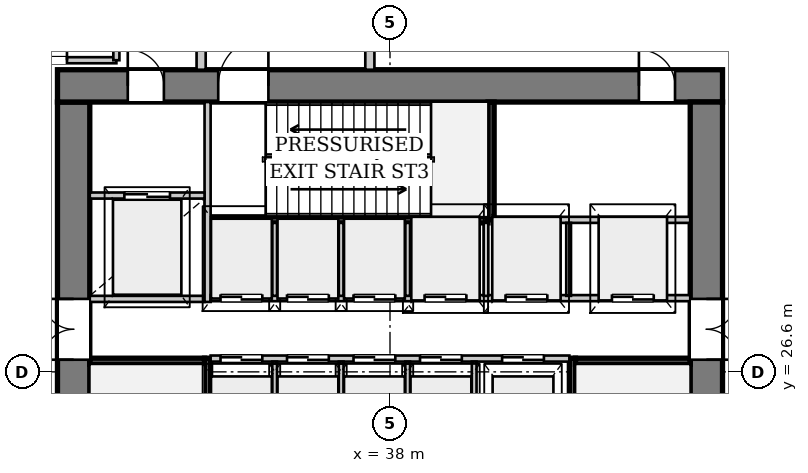
"""IFC4 building model, lengths in metres.
Left out: names, types, materials, properties, quantities, classifications, styles, units other than length and angle.
Written with IfcOpenShell. Run it as: python <this file> out.ifc"""

import sys

from ifc_helpers import new_model, si_unit, direction, frame, frame_2d, origin, place, context, subcontext, project, spatial, rectangle, extrude, source, transform, mapped, element, fill, save


model = new_model("IFC4")
c1 = context("Model", 3, precision=1e-05, world=origin(), true_north=direction((0.0, 1.0)))
c2 = subcontext(c1, "Body", "Model", "MODEL_VIEW")
j1 = project(units=[si_unit("LENGTHUNIT", "METRE"), si_unit("PLANEANGLEUNIT", "RADIAN")], contexts=[c1])
p1 = place(None, origin())
s1 = spatial("IfcSite", under=j1, at=p1, CompositionType="ELEMENT")
p2 = place(p1, origin())
s2 = spatial("IfcBuilding", under=s1, at=p2, CompositionType="ELEMENT")
p3 = place(p2, origin())
s3 = spatial("IfcBuildingStorey", under=s2, at=p3, CompositionType="ELEMENT", Elevation=0.0)
p4 = place(p3, frame((29.675, 19.5, 0.0), z_axis=(0.0, 0.0, 1.0), x_axis=(0.0, 1.0, 0.0)))
e1 = element("IfcWall", 1, at=p4, inside=s3, PredefinedType="SHEAR", context=c2, shape_type="SweptSolid", body=[
    extrude(rectangle(XDim=14.2, YDim=0.85, at=frame_2d((7.1, 0.0))), origin(), (0.0, 0.0, 1.0), 5.08),
])
p5 = place(p4, frame((7.42, 0.0, 0.0)))
e2 = element("IfcOpeningElement", 2, at=p5, cuts=e1, PredefinedType="OPENING", context=c2, shape_type="SweptSolid", body=[
    extrude(rectangle(XDim=1.6, YDim=2.2, at=frame_2d((0.8, 1.1))), frame((0.0, 0.435, 0.0), z_axis=(0.0, -1.0, 0.0), x_axis=(1.0, 0.0, 0.0)), (0.0, 0.0, 1.0), 0.87),
])
p6 = place(p3, frame((29.25, 34.125, 0.0), z_axis=(0.0, 0.0, 1.0), x_axis=(1.0, 0.0, 0.0)))
e3 = element("IfcWall", 3, at=p6, inside=s3, PredefinedType="SHEAR", context=c2, shape_type="SweptSolid", body=[
    extrude(rectangle(XDim=17.5, YDim=0.85, at=frame_2d((8.75, 0.0))), origin(), (0.0, 0.0, 1.0), 5.08),
])
p7 = place(p6, frame((1.85, 0.0, 0.0)))
e4 = element("IfcOpeningElement", 4, at=p7, cuts=e3, PredefinedType="OPENING", context=c2, shape_type="SweptSolid", body=[
    extrude(rectangle(XDim=0.95, YDim=2.1, at=frame_2d((0.475, 1.05))), frame((0.0, 0.435, 0.0), z_axis=(0.0, -1.0, 0.0), x_axis=(1.0, 0.0, 0.0)), (0.0, 0.0, 1.0), 0.87),
])
p8 = place(p6, frame((4.23, 0.0, 0.0)))
e5 = element("IfcOpeningElement", 5, at=p8, cuts=e3, PredefinedType="OPENING", context=c2, shape_type="SweptSolid", body=[
    extrude(rectangle(XDim=1.32, YDim=2.2, at=frame_2d((0.66, 1.1))), frame((0.0, 0.435, 0.0), z_axis=(0.0, -1.0, 0.0), x_axis=(1.0, 0.0, 0.0)), (0.0, 0.0, 1.0), 0.87),
])
p9 = place(p6, frame((15.3, 0.0, 0.0)))
e6 = element("IfcOpeningElement", 6, at=p9, cuts=e3, PredefinedType="OPENING", context=c2, shape_type="SweptSolid", body=[
    extrude(rectangle(XDim=0.95, YDim=2.1, at=frame_2d((0.475, 1.05))), frame((0.0, 0.435, 0.0), z_axis=(0.0, -1.0, 0.0), x_axis=(1.0, 0.0, 0.0)), (0.0, 0.0, 1.0), 0.87),
])
p10 = place(p3, frame((46.325, 33.7, 0.0), z_axis=(0.0, 0.0, 1.0), x_axis=(0.0, -1.0, 0.0)))
e7 = element("IfcWall", 7, at=p10, inside=s3, PredefinedType="SHEAR", context=c2, shape_type="SweptSolid", body=[
    extrude(rectangle(XDim=14.2, YDim=0.85, at=frame_2d((7.1, 0.0))), origin(), (0.0, 0.0, 1.0), 5.08),
])
p11 = place(p10, frame((5.18, 0.0, 0.0)))
e8 = element("IfcOpeningElement", 8, at=p11, cuts=e7, PredefinedType="OPENING", context=c2, shape_type="SweptSolid", body=[
    extrude(rectangle(XDim=1.6, YDim=2.2, at=frame_2d((0.8, 1.1))), frame((0.0, 0.435, 0.0), z_axis=(0.0, -1.0, 0.0), x_axis=(1.0, 0.0, 0.0)), (0.0, 0.0, 1.0), 0.87),
])
p12 = place(p3, frame((33.2, 19.5, 0.0), z_axis=(0.0, 0.0, 1.0), x_axis=(0.0, 1.0, 0.0)))
e9 = element("IfcWall", 9, at=p12, inside=s3, PredefinedType="PARTITIONING", context=c2, shape_type="SweptSolid", body=[
    extrude(rectangle(XDim=7.46, YDim=0.16, at=frame_2d((3.73, 0.0))), origin(), (0.0, 0.0, 1.0), 5.08),
])
p13 = place(p12, frame((0.08, 0.0, 0.0)))
e10 = element("IfcOpeningElement", 10, at=p13, cuts=e9, PredefinedType="OPENING", context=c2, shape_type="SweptSolid", body=[
    extrude(rectangle(XDim=1.32, YDim=2.2, at=frame_2d((0.66, 1.1))), frame((0.0, 0.09, 0.0), z_axis=(0.0, -1.0, 0.0), x_axis=(1.0, 0.0, 0.0)), (0.0, 0.0, 1.0), 0.18),
])
p14 = place(p3, frame((30.1, 26.88, 0.0), z_axis=(0.0, 0.0, 1.0), x_axis=(1.0, 0.0, 0.0)))
e11 = element("IfcWall", 11, at=p14, inside=s3, PredefinedType="PARTITIONING", context=c2, shape_type="SweptSolid", body=[
    extrude(rectangle(XDim=3.02, YDim=0.16, at=frame_2d((1.51, 0.0))), origin(), (0.0, 0.0, 1.0), 5.08),
])
p15 = place(p3, frame((42.8, 26.96, 0.0), z_axis=(0.0, 0.0, 1.0), x_axis=(0.0, -1.0, 0.0)))
e12 = element("IfcWall", 12, at=p15, inside=s3, PredefinedType="PARTITIONING", context=c2, shape_type="SweptSolid", body=[
    extrude(rectangle(XDim=7.46, YDim=0.16, at=frame_2d((3.73, 0.0))), origin(), (0.0, 0.0, 1.0), 5.08),
])
p16 = place(p15, frame((6.06, 0.0, 0.0)))
e13 = element("IfcOpeningElement", 13, at=p16, cuts=e12, PredefinedType="OPENING", context=c2, shape_type="SweptSolid", body=[
    extrude(rectangle(XDim=1.32, YDim=2.2, at=frame_2d((0.66, 1.1))), frame((0.0, 0.09, 0.0), z_axis=(0.0, -1.0, 0.0), x_axis=(1.0, 0.0, 0.0)), (0.0, 0.0, 1.0), 0.18),
])
p17 = place(p3, frame((42.88, 26.88, 0.0), z_axis=(0.0, 0.0, 1.0), x_axis=(1.0, 0.0, 0.0)))
e14 = element("IfcWall", 14, at=p17, inside=s3, PredefinedType="PARTITIONING", context=c2, shape_type="SweptSolid", body=[
    extrude(rectangle(XDim=3.02, YDim=0.16, at=frame_2d((1.51, 0.0))), origin(), (0.0, 0.0, 1.0), 5.08),
])
p18 = place(p3, frame((33.28, 30.6, 0.0), z_axis=(0.0, 0.0, 1.0), x_axis=(1.0, 0.0, 0.0)))
e15 = element("IfcWall", 15, at=p18, inside=s3, PredefinedType="PARTITIONING", context=c2, shape_type="SweptSolid", body=[
    extrude(rectangle(XDim=7.3, YDim=0.16, at=frame_2d((3.65, 0.0))), origin(), (0.0, 0.0, 1.0), 5.08),
])
p19 = place(p3, frame((40.66, 30.6, 0.0), z_axis=(0.0, 0.0, 1.0), x_axis=(0.0, 1.0, 0.0)))
e16 = element("IfcWall", 16, at=p19, inside=s3, PredefinedType="PARTITIONING", context=c2, shape_type="SweptSolid", body=[
    extrude(rectangle(XDim=3.1, YDim=0.16, at=frame_2d((1.55, 0.0))), origin(), (0.0, 0.0, 1.0), 5.08),
])
p20 = place(p3, frame((30.1, 28.52, 0.0), z_axis=(0.0, 0.0, 1.0), x_axis=(1.0, 0.0, 0.0)))
e17 = element("IfcWall", 17, at=p20, inside=s3, PredefinedType="PARTITIONING", context=c2, shape_type="SweptSolid", body=[
    extrude(rectangle(XDim=3.02, YDim=0.16, at=frame_2d((1.51, 0.0))), origin(), (0.0, 0.0, 1.0), 5.08),
])
p21 = place(p3, frame((33.2, 28.44, 0.0), z_axis=(0.0, 0.0, 1.0), x_axis=(0.0, 1.0, 0.0)))
e18 = element("IfcWall", 18, at=p21, inside=s3, PredefinedType="PARTITIONING", context=c2, shape_type="SweptSolid", body=[
    extrude(rectangle(XDim=5.26, YDim=0.16, at=frame_2d((2.63, 0.0))), origin(), (0.0, 0.0, 1.0), 5.08),
])
p22 = place(p3, frame((30.1, 31.24, 0.0), z_axis=(0.0, 0.0, 1.0), x_axis=(1.0, 0.0, 0.0)))
e19 = element("IfcWall", 19, at=p22, inside=s3, PredefinedType="PARTITIONING", context=c2, shape_type="SweptSolid", body=[
    extrude(rectangle(XDim=3.02, YDim=0.16, at=frame_2d((1.51, 0.0))), origin(), (0.0, 0.0, 1.0), 5.08),
])
p23 = place(p22, frame((0.91, 0.0, 0.0)))
e20 = element("IfcOpeningElement", 20, at=p23, cuts=e19, PredefinedType="OPENING", context=c2, shape_type="SweptSolid", body=[
    extrude(rectangle(XDim=1.2, YDim=2.2, at=frame_2d((0.6, 1.1))), frame((0.0, 0.09, 0.0), z_axis=(0.0, -1.0, 0.0), x_axis=(1.0, 0.0, 0.0)), (0.0, 0.0, 1.0), 0.18),
])
p24 = place(p3, frame((33.28, 26.95, 0.0), z_axis=(0.0, 0.0, 1.0), x_axis=(1.0, 0.0, 0.0)))
e21 = element("IfcWall", 21, at=p24, inside=s3, PredefinedType="PARTITIONING", context=c2, shape_type="SweptSolid", body=[
    extrude(rectangle(XDim=9.44, YDim=0.16, at=frame_2d((4.72, 0.0))), origin(), (0.0, 0.0, 1.0), 5.08),
])
p25 = place(p24, frame((0.26, 0.0, 0.0)))
e22 = element("IfcOpeningElement", 22, at=p25, cuts=e21, PredefinedType="OPENING", context=c2, shape_type="SweptSolid", body=[
    extrude(rectangle(XDim=1.1, YDim=2.2, at=frame_2d((0.55, 1.1))), frame((0.0, 0.09, 0.0), z_axis=(0.0, -1.0, 0.0), x_axis=(1.0, 0.0, 0.0)), (0.0, 0.0, 1.0), 0.18),
])
p26 = place(p24, frame((2.01, 0.0, 0.0)))
e23 = element("IfcOpeningElement", 23, at=p26, cuts=e21, PredefinedType="OPENING", context=c2, shape_type="SweptSolid", body=[
    extrude(rectangle(XDim=1.1, YDim=2.2, at=frame_2d((0.55, 1.1))), frame((0.0, 0.09, 0.0), z_axis=(0.0, -1.0, 0.0), x_axis=(1.0, 0.0, 0.0)), (0.0, 0.0, 1.0), 0.18),
])
p27 = place(p24, frame((3.76, 0.0, 0.0)))
e24 = element("IfcOpeningElement", 24, at=p27, cuts=e21, PredefinedType="OPENING", context=c2, shape_type="SweptSolid", body=[
    extrude(rectangle(XDim=1.1, YDim=2.2, at=frame_2d((0.55, 1.1))), frame((0.0, 0.09, 0.0), z_axis=(0.0, -1.0, 0.0), x_axis=(1.0, 0.0, 0.0)), (0.0, 0.0, 1.0), 0.18),
])
p28 = place(p24, frame((5.51, 0.0, 0.0)))
e25 = element("IfcOpeningElement", 25, at=p28, cuts=e21, PredefinedType="OPENING", context=c2, shape_type="SweptSolid", body=[
    extrude(rectangle(XDim=1.1, YDim=2.2, at=frame_2d((0.55, 1.1))), frame((0.0, 0.09, 0.0), z_axis=(0.0, -1.0, 0.0), x_axis=(1.0, 0.0, 0.0)), (0.0, 0.0, 1.0), 0.18),
])
p29 = place(p24, frame((7.67, 0.0, 0.0)))
e26 = element("IfcOpeningElement", 26, at=p29, cuts=e21, PredefinedType="OPENING", context=c2, shape_type="SweptSolid", body=[
    extrude(rectangle(XDim=1.1, YDim=2.2, at=frame_2d((0.55, 1.1))), frame((0.0, 0.09, 0.0), z_axis=(0.0, -1.0, 0.0), x_axis=(1.0, 0.0, 0.0)), (0.0, 0.0, 1.0), 0.18),
])
for number, where, z_axis, x_axis in (
    (27, (34.965, 24.56, 0.0), (0.0, 0.0, 1.0), (0.0, 1.0, 0.0)),
    (28, (36.715, 24.56, 0.0), (0.0, 0.0, 1.0), (0.0, 1.0, 0.0)),
    (29, (38.465, 24.56, 0.0), (0.0, 0.0, 1.0), (0.0, 1.0, 0.0)),
    (30, (40.215, 24.56, 0.0), (0.0, 0.0, 1.0), (0.0, 1.0, 0.0)),
):
    element("IfcWall", number, at=place(p3, frame(where, z_axis=z_axis, x_axis=x_axis)), inside=s3, PredefinedType="PARTITIONING", context=c2, shape_type="SweptSolid", body=[
        extrude(rectangle(XDim=2.31, YDim=0.125, at=frame_2d((1.155, 0.0))), origin(), (0.0, 0.0, 1.0), 5.08),
    ])
p30 = place(p3, frame((33.28, 28.54, 0.0), z_axis=(0.0, 0.0, 1.0), x_axis=(1.0, 0.0, 0.0)))
e31 = element("IfcWall", 31, at=p30, inside=s3, PredefinedType="PARTITIONING", context=c2, shape_type="SweptSolid", body=[
    extrude(rectangle(XDim=12.62, YDim=0.16, at=frame_2d((6.31, 0.0))), origin(), (0.0, 0.0, 1.0), 5.08),
])
p31 = place(p30, frame((0.26, 0.0, 0.0)))
e32 = element("IfcOpeningElement", 32, at=p31, cuts=e31, PredefinedType="OPENING", context=c2, shape_type="SweptSolid", body=[
    extrude(rectangle(XDim=1.1, YDim=2.2, at=frame_2d((0.55, 1.1))), frame((0.0, 0.09, 0.0), z_axis=(0.0, -1.0, 0.0), x_axis=(1.0, 0.0, 0.0)), (0.0, 0.0, 1.0), 0.18),
])
p32 = place(p30, frame((2.01, 0.0, 0.0)))
e33 = element("IfcOpeningElement", 33, at=p32, cuts=e31, PredefinedType="OPENING", context=c2, shape_type="SweptSolid", body=[
    extrude(rectangle(XDim=1.1, YDim=2.2, at=frame_2d((0.55, 1.1))), frame((0.0, 0.09, 0.0), z_axis=(0.0, -1.0, 0.0), x_axis=(1.0, 0.0, 0.0)), (0.0, 0.0, 1.0), 0.18),
])
p33 = place(p30, frame((3.76, 0.0, 0.0)))
e34 = element("IfcOpeningElement", 34, at=p33, cuts=e31, PredefinedType="OPENING", context=c2, shape_type="SweptSolid", body=[
    extrude(rectangle(XDim=1.1, YDim=2.2, at=frame_2d((0.55, 1.1))), frame((0.0, 0.09, 0.0), z_axis=(0.0, -1.0, 0.0), x_axis=(1.0, 0.0, 0.0)), (0.0, 0.0, 1.0), 0.18),
])
p34 = place(p30, frame((5.63, 0.0, 0.0)))
e35 = element("IfcOpeningElement", 35, at=p34, cuts=e31, PredefinedType="OPENING", context=c2, shape_type="SweptSolid", body=[
    extrude(rectangle(XDim=1.1, YDim=2.2, at=frame_2d((0.55, 1.1))), frame((0.0, 0.09, 0.0), z_axis=(0.0, -1.0, 0.0), x_axis=(1.0, 0.0, 0.0)), (0.0, 0.0, 1.0), 0.18),
])
p35 = place(p30, frame((7.76, 0.0, 0.0)))
e36 = element("IfcOpeningElement", 36, at=p35, cuts=e31, PredefinedType="OPENING", context=c2, shape_type="SweptSolid", body=[
    extrude(rectangle(XDim=1.1, YDim=2.2, at=frame_2d((0.55, 1.1))), frame((0.0, 0.09, 0.0), z_axis=(0.0, -1.0, 0.0), x_axis=(1.0, 0.0, 0.0)), (0.0, 0.0, 1.0), 0.18),
])
p36 = place(p30, frame((10.56, 0.0, 0.0)))
e37 = element("IfcOpeningElement", 37, at=p36, cuts=e31, PredefinedType="OPENING", context=c2, shape_type="SweptSolid", body=[
    extrude(rectangle(XDim=1.1, YDim=2.2, at=frame_2d((0.55, 1.1))), frame((0.0, 0.09, 0.0), z_axis=(0.0, -1.0, 0.0), x_axis=(1.0, 0.0, 0.0)), (0.0, 0.0, 1.0), 0.18),
])
p37 = place(p3, frame((40.72, 30.6, 0.0), z_axis=(0.0, 0.0, 1.0), x_axis=(1.0, 0.0, 0.0)))
e38 = element("IfcWall", 38, at=p37, inside=s3, PredefinedType="PARTITIONING", context=c2, shape_type="SweptSolid", body=[
    extrude(rectangle(XDim=5.18, YDim=0.16, at=frame_2d((2.59, 0.0))), origin(), (0.0, 0.0, 1.0), 5.08),
])
for number, where, z_axis, x_axis in (
    (39, (34.965, 28.6, 0.0), (0.0, 0.0, 1.0), (0.0, 1.0, 0.0)),
    (40, (36.715, 28.6, 0.0), (0.0, 0.0, 1.0), (0.0, 1.0, 0.0)),
    (41, (38.465, 28.6, 0.0), (0.0, 0.0, 1.0), (0.0, 1.0, 0.0)),
    (42, (40.525, 28.6, 0.0), (0.0, 0.0, 1.0), (0.0, 1.0, 0.0)),
    (43, (42.7, 28.6, 0.0), (0.0, 0.0, 1.0), (0.0, 1.0, 0.0)),
):
    element("IfcWall", number, at=place(p3, frame(where, z_axis=z_axis, x_axis=x_axis)), inside=s3, PredefinedType="PARTITIONING", context=c2, shape_type="SweptSolid", body=[
        extrude(rectangle(XDim=1.92, YDim=0.125, at=frame_2d((0.96, 0.0))), origin(), (0.0, 0.0, 1.0), 5.08),
    ])
for number, where, z_axis, x_axis in (
    (44, (33.03, 34.55, 0.0), (0.0, 0.0, 1.0), (0.0, 1.0, 0.0)),
    (45, (37.47, 34.55, 0.0), (0.0, 0.0, 1.0), (0.0, 1.0, 0.0)),
):
    element("IfcWall", number, at=place(p3, frame(where, z_axis=z_axis, x_axis=x_axis)), inside=s3, PredefinedType="PARTITIONING", context=c2, shape_type="SweptSolid", body=[
        extrude(rectangle(XDim=15.67, YDim=0.24, at=frame_2d((7.835, 0.0))), origin(), (0.0, 0.0, 1.0), 4.43),
    ])
p38 = place(p3, frame((24.2, 34.8, 0.0), z_axis=(0.0, 0.0, 1.0), x_axis=(1.0, 0.0, 0.0)))
e46 = element("IfcWall", 46, at=p38, inside=s3, PredefinedType="PARTITIONING", context=c2, shape_type="SweptSolid", body=[
    extrude(rectangle(XDim=6.6, YDim=0.16, at=frame_2d((3.3, 0.0))), origin(), (0.0, 0.0, 1.0), 4.43),
])
p39 = place(p38, frame((1.0, 0.0, 0.0)))
e47 = element("IfcOpeningElement", 47, at=p39, cuts=e46, PredefinedType="OPENING", context=c2, shape_type="SweptSolid", body=[
    extrude(rectangle(XDim=0.9, YDim=2.1, at=frame_2d((0.45, 1.05))), frame((0.0, 0.09, 0.0), z_axis=(0.0, -1.0, 0.0), x_axis=(1.0, 0.0, 0.0)), (0.0, 0.0, 1.0), 0.18),
])
p40 = place(p38, frame((4.4, 0.0, 0.0)))
e48 = element("IfcOpeningElement", 48, at=p40, cuts=e46, PredefinedType="OPENING", context=c2, shape_type="SweptSolid", body=[
    extrude(rectangle(XDim=0.9, YDim=2.1, at=frame_2d((0.45, 1.05))), frame((0.0, 0.09, 0.0), z_axis=(0.0, -1.0, 0.0), x_axis=(1.0, 0.0, 0.0)), (0.0, 0.0, 1.0), 0.18),
])
p41 = place(p3, frame((30.8, 34.8, 0.0), z_axis=(0.0, 0.0, 1.0), x_axis=(0.0, 1.0, 0.0)))
e49 = element("IfcWall", 49, at=p41, inside=s3, PredefinedType="PARTITIONING", context=c2, shape_type="SweptSolid", body=[
    extrude(rectangle(XDim=4.4, YDim=0.16, at=frame_2d((2.2, 0.0))), origin(), (0.0, 0.0, 1.0), 4.43),
])
m1 = source(origin(), c2, "Body", "SweptSolid", [
    extrude(rectangle(XDim=1.6, YDim=2.2, at=frame_2d((0.8, 1.1))), frame((0.0, 0.025, 0.0), z_axis=(0.0, -1.0, 0.0), x_axis=(1.0, 0.0, 0.0)), (0.0, 0.0, 1.0), 0.05),
])
p42 = place(p5, origin())
e50 = element("IfcDoor", 50, at=p42, inside=s3, OperationType="DOUBLE_DOOR_SINGLE_SWING", PredefinedType="DOOR", context=c2, shape_type="MappedRepresentation", body=[
    mapped(m1, transform((0.0, 0.0, 0.0), x_axis=(1.0, 0.0, 0.0), y_axis=(0.0, 1.0, 0.0), z_axis=(0.0, 0.0, 1.0), scale=1.0)),
])
fill(e2, e50)
m2 = source(origin(), c2, "Body", "SweptSolid", [
    extrude(rectangle(XDim=0.95, YDim=2.1, at=frame_2d((0.475, 1.05))), frame((0.0, 0.025, 0.0), z_axis=(0.0, -1.0, 0.0), x_axis=(1.0, 0.0, 0.0)), (0.0, 0.0, 1.0), 0.05),
])
p43 = place(p7, origin())
e51 = element("IfcDoor", 51, at=p43, inside=s3, OperationType="SINGLE_SWING_LEFT", PredefinedType="DOOR", context=c2, shape_type="MappedRepresentation", body=[
    mapped(m2, transform((0.0, 0.0, 0.0), x_axis=(1.0, 0.0, 0.0), y_axis=(0.0, 1.0, 0.0), z_axis=(0.0, 0.0, 1.0), scale=1.0)),
])
fill(e4, e51)
m3 = source(origin(), c2, "Body", "SweptSolid", [
    extrude(rectangle(XDim=1.32, YDim=2.2, at=frame_2d((0.66, 1.1))), frame((0.0, 0.025, 0.0), z_axis=(0.0, -1.0, 0.0), x_axis=(1.0, 0.0, 0.0)), (0.0, 0.0, 1.0), 0.05),
])
p44 = place(p8, origin())
e52 = element("IfcDoor", 52, at=p44, inside=s3, OperationType="SINGLE_SWING_RIGHT", PredefinedType="DOOR", context=c2, shape_type="MappedRepresentation", body=[
    mapped(m3, transform((0.0, 0.0, 0.0), x_axis=(1.0, 0.0, 0.0), y_axis=(0.0, 1.0, 0.0), z_axis=(0.0, 0.0, 1.0), scale=1.0)),
])
fill(e5, e52)
p45 = place(p11, origin())
e53 = element("IfcDoor", 53, at=p45, inside=s3, OperationType="DOUBLE_DOOR_SINGLE_SWING", PredefinedType="DOOR", context=c2, shape_type="MappedRepresentation", body=[
    mapped(m1, transform((0.0, 0.0, 0.0), x_axis=(1.0, 0.0, 0.0), y_axis=(0.0, 1.0, 0.0), z_axis=(0.0, 0.0, 1.0), scale=1.0)),
])
fill(e8, e53)
m4 = source(origin(), c2, "Body", "SweptSolid", [
    extrude(rectangle(XDim=1.2, YDim=2.2, at=frame_2d((0.6, 1.1))), frame((0.0, 0.025, 0.0), z_axis=(0.0, -1.0, 0.0), x_axis=(1.0, 0.0, 0.0)), (0.0, 0.0, 1.0), 0.05),
])
p46 = place(p23, origin())
e54 = element("IfcDoor", 54, at=p46, inside=s3, OperationType="DOUBLE_DOOR_SLIDING", PredefinedType="DOOR", context=c2, shape_type="MappedRepresentation", body=[
    mapped(m4, transform((0.0, 0.0, 0.0), x_axis=(1.0, 0.0, 0.0), y_axis=(0.0, 1.0, 0.0), z_axis=(0.0, 0.0, 1.0), scale=1.0)),
])
fill(e20, e54)
m5 = source(origin(), c2, "Body", "SweptSolid", [
    extrude(rectangle(XDim=1.1, YDim=2.2, at=frame_2d((0.55, 1.1))), frame((0.0, 0.025, 0.0), z_axis=(0.0, -1.0, 0.0), x_axis=(1.0, 0.0, 0.0)), (0.0, 0.0, 1.0), 0.05),
])
p47 = place(p25, origin())
e55 = element("IfcDoor", 55, at=p47, inside=s3, OperationType="DOUBLE_DOOR_SLIDING", PredefinedType="DOOR", context=c2, shape_type="MappedRepresentation", body=[
    mapped(m5, transform((0.0, 0.0, 0.0), x_axis=(1.0, 0.0, 0.0), y_axis=(0.0, 1.0, 0.0), z_axis=(0.0, 0.0, 1.0), scale=1.0)),
])
fill(e22, e55)
p48 = place(p26, origin())
e56 = element("IfcDoor", 56, at=p48, inside=s3, OperationType="DOUBLE_DOOR_SLIDING", PredefinedType="DOOR", context=c2, shape_type="MappedRepresentation", body=[
    mapped(m5, transform((0.0, 0.0, 0.0), x_axis=(1.0, 0.0, 0.0), y_axis=(0.0, 1.0, 0.0), z_axis=(0.0, 0.0, 1.0), scale=1.0)),
])
fill(e23, e56)
p49 = place(p27, origin())
e57 = element("IfcDoor", 57, at=p49, inside=s3, OperationType="DOUBLE_DOOR_SLIDING", PredefinedType="DOOR", context=c2, shape_type="MappedRepresentation", body=[
    mapped(m5, transform((0.0, 0.0, 0.0), x_axis=(1.0, 0.0, 0.0), y_axis=(0.0, 1.0, 0.0), z_axis=(0.0, 0.0, 1.0), scale=1.0)),
])
fill(e24, e57)
p50 = place(p28, origin())
e58 = element("IfcDoor", 58, at=p50, inside=s3, OperationType="DOUBLE_DOOR_SLIDING", PredefinedType="DOOR", context=c2, shape_type="MappedRepresentation", body=[
    mapped(m5, transform((0.0, 0.0, 0.0), x_axis=(1.0, 0.0, 0.0), y_axis=(0.0, 1.0, 0.0), z_axis=(0.0, 0.0, 1.0), scale=1.0)),
])
fill(e25, e58)
p51 = place(p29, origin())
e59 = element("IfcDoor", 59, at=p51, inside=s3, OperationType="DOUBLE_DOOR_SLIDING", PredefinedType="DOOR", context=c2, shape_type="MappedRepresentation", body=[
    mapped(m5, transform((0.0, 0.0, 0.0), x_axis=(1.0, 0.0, 0.0), y_axis=(0.0, 1.0, 0.0), z_axis=(0.0, 0.0, 1.0), scale=1.0)),
])
fill(e26, e59)
p52 = place(p31, origin())
e60 = element("IfcDoor", 60, at=p52, inside=s3, OperationType="DOUBLE_DOOR_SLIDING", PredefinedType="DOOR", context=c2, shape_type="MappedRepresentation", body=[
    mapped(m5, transform((0.0, 0.0, 0.0), x_axis=(1.0, 0.0, 0.0), y_axis=(0.0, 1.0, 0.0), z_axis=(0.0, 0.0, 1.0), scale=1.0)),
])
fill(e32, e60)
p53 = place(p32, origin())
e61 = element("IfcDoor", 61, at=p53, inside=s3, OperationType="DOUBLE_DOOR_SLIDING", PredefinedType="DOOR", context=c2, shape_type="MappedRepresentation", body=[
    mapped(m5, transform((0.0, 0.0, 0.0), x_axis=(1.0, 0.0, 0.0), y_axis=(0.0, 1.0, 0.0), z_axis=(0.0, 0.0, 1.0), scale=1.0)),
])
fill(e33, e61)
p54 = place(p33, origin())
e62 = element("IfcDoor", 62, at=p54, inside=s3, OperationType="DOUBLE_DOOR_SLIDING", PredefinedType="DOOR", context=c2, shape_type="MappedRepresentation", body=[
    mapped(m5, transform((0.0, 0.0, 0.0), x_axis=(1.0, 0.0, 0.0), y_axis=(0.0, 1.0, 0.0), z_axis=(0.0, 0.0, 1.0), scale=1.0)),
])
fill(e34, e62)
p55 = place(p34, origin())
e63 = element("IfcDoor", 63, at=p55, inside=s3, OperationType="DOUBLE_DOOR_SLIDING", PredefinedType="DOOR", context=c2, shape_type="MappedRepresentation", body=[
    mapped(m5, transform((0.0, 0.0, 0.0), x_axis=(1.0, 0.0, 0.0), y_axis=(0.0, 1.0, 0.0), z_axis=(0.0, 0.0, 1.0), scale=1.0)),
])
fill(e35, e63)
p56 = place(p35, origin())
e64 = element("IfcDoor", 64, at=p56, inside=s3, OperationType="DOUBLE_DOOR_SLIDING", PredefinedType="DOOR", context=c2, shape_type="MappedRepresentation", body=[
    mapped(m5, transform((0.0, 0.0, 0.0), x_axis=(1.0, 0.0, 0.0), y_axis=(0.0, 1.0, 0.0), z_axis=(0.0, 0.0, 1.0), scale=1.0)),
])
fill(e36, e64)
p57 = place(p36, origin())
e65 = element("IfcDoor", 65, at=p57, inside=s3, OperationType="DOUBLE_DOOR_SLIDING", PredefinedType="DOOR", context=c2, shape_type="MappedRepresentation", body=[
    mapped(m5, transform((0.0, 0.0, 0.0), x_axis=(1.0, 0.0, 0.0), y_axis=(0.0, 1.0, 0.0), z_axis=(0.0, 0.0, 1.0), scale=1.0)),
])
fill(e37, e65)
p58 = place(p9, origin())
e66 = element("IfcDoor", 66, at=p58, inside=s3, OperationType="SINGLE_SWING_LEFT", PredefinedType="DOOR", context=c2, shape_type="MappedRepresentation", body=[
    mapped(m2, transform((0.0, 0.0, 0.0), x_axis=(1.0, 0.0, 0.0), y_axis=(0.0, 1.0, 0.0), z_axis=(0.0, 0.0, 1.0), scale=1.0)),
])
fill(e6, e66)
m6 = source(origin(), c2, "Body", "SweptSolid", [
    extrude(rectangle(XDim=0.9, YDim=2.1, at=frame_2d((0.45, 1.05))), frame((0.0, 0.025, 0.0), z_axis=(0.0, -1.0, 0.0), x_axis=(1.0, 0.0, 0.0)), (0.0, 0.0, 1.0), 0.05),
])
p59 = place(p40, origin())
e67 = element("IfcDoor", 67, at=p59, inside=s3, OperationType="SINGLE_SWING_RIGHT", PredefinedType="DOOR", context=c2, shape_type="MappedRepresentation", body=[
    mapped(m6, transform((0.0, 0.0, 0.0), x_axis=(1.0, 0.0, 0.0), y_axis=(0.0, 1.0, 0.0), z_axis=(0.0, 0.0, 1.0), scale=1.0)),
])
fill(e48, e67)
save(model, sys.argv[1])
